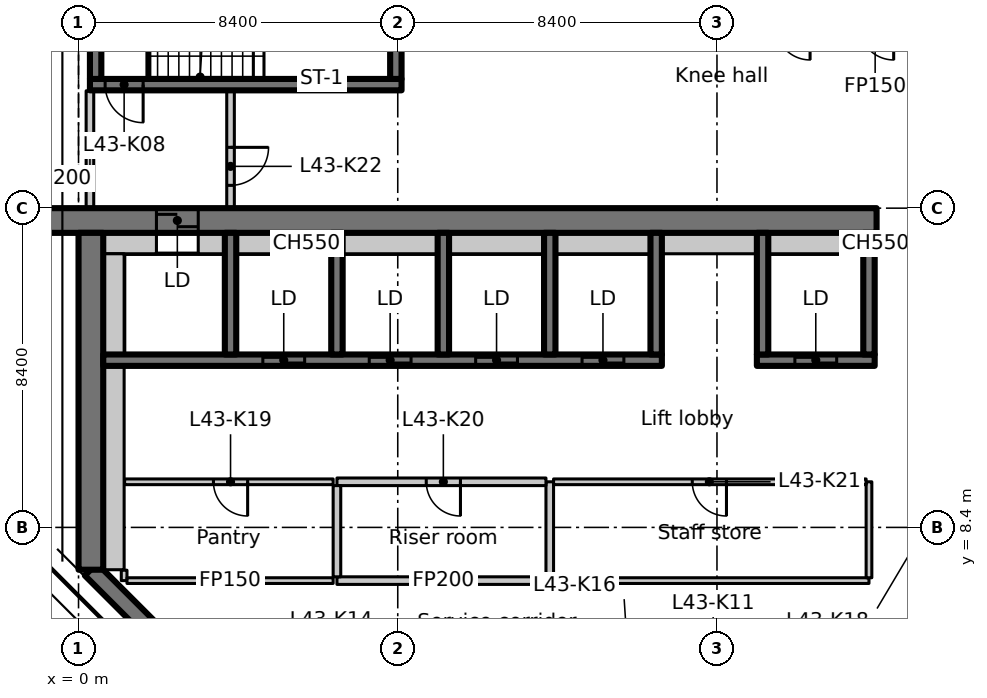
"""IFC4 building model, lengths in metres.
Left out: names, types, materials, properties, quantities, classifications, styles, units other than length and angle.
Written with IfcOpenShell. Run it as: python <this file> out.ifc"""

import sys

from ifc_helpers import new_model, si_unit, direction, frame, frame_2d, origin, place, context, subcontext, project, spatial, rectangle, extrude, element, fill, save


model = new_model("IFC4")
c1 = context("Model", 3, precision=1e-05, world=origin(), true_north=direction((0.0, 1.0)))
c2 = subcontext(c1, "Body", "Model", "MODEL_VIEW")
j1 = project(units=[si_unit("LENGTHUNIT", "METRE"), si_unit("PLANEANGLEUNIT", "RADIAN")], contexts=[c1])
p1 = place(None, origin())
s1 = spatial("IfcSite", under=j1, at=p1, CompositionType="ELEMENT")
p2 = place(p1, origin())
s2 = spatial("IfcBuilding", under=s1, at=p2, CompositionType="ELEMENT")
p3 = place(p2, frame((0.0, 0.0, 174.0)))
s3 = spatial("IfcBuildingStorey", under=s2, at=p3, CompositionType="ELEMENT", Elevation=174.0)
p4 = place(p3, frame((0.325, 7.293, 0.0), z_axis=(0.0, 0.0, 1.0), x_axis=(0.707106781187, -0.707106781187, 0.0)))
e1 = element("IfcWall", 1, at=p4, inside=s3, PredefinedType="SHEAR", context=c2, shape_type="SweptSolid", body=[
    extrude(rectangle(XDim=9.854, YDim=0.45, at=frame_2d((4.927, 0.0))), origin(), (0.0, 0.0, 1.0), 3.35),
])
p5 = place(p3, frame((-1.1, 16.475, 0.0), z_axis=(0.0, 0.0, 1.0), x_axis=(1.0, 0.0, 0.0)))
e2 = element("IfcWall", 2, at=p5, inside=s3, PredefinedType="SHEAR", context=c2, shape_type="SweptSolid", body=[
    extrude(rectangle(XDim=22.1, YDim=0.65, at=frame_2d((11.05, 0.0))), origin(), (0.0, 0.0, 1.0), 3.35),
])
p6 = place(p5, frame((3.15, 0.0, 0.0)))
e3 = element("IfcOpeningElement", 3, at=p6, cuts=e2, PredefinedType="OPENING", context=c2, shape_type="SweptSolid", body=[
    extrude(rectangle(XDim=1.1, YDim=2.3, at=frame_2d((0.55, 1.15))), frame((0.0, 0.335, 0.0), z_axis=(0.0, -1.0, 0.0), x_axis=(1.0, 0.0, 0.0)), (0.0, 0.0, 1.0), 0.67),
])
p7 = place(p3, frame((0.325, 7.286, 0.0), z_axis=(0.0, 0.0, 1.0), x_axis=(0.0, 1.0, 0.0)))
e4 = element("IfcWall", 4, at=p7, inside=s3, PredefinedType="SHEAR", context=c2, shape_type="SweptSolid", body=[
    extrude(rectangle(XDim=8.864, YDim=0.65, at=frame_2d((4.432, 0.0))), origin(), (0.0, 0.0, 1.0), 3.35),
])
p8 = place(p3, frame((0.65, 15.875, 0.0), z_axis=(0.0, 0.0, 1.0), x_axis=(1.0, 0.0, 0.0)))
e5 = element("IfcWall", 5, at=p8, inside=s3, PredefinedType="PARTITIONING", context=c2, shape_type="SweptSolid", body=[
    extrude(rectangle(XDim=1.4, YDim=0.55, at=frame_2d((0.7, 0.0))), origin(), (0.0, 0.0, 1.0), 3.35),
])
p9 = place(p3, frame((0.65, 12.8, 0.0), z_axis=(0.0, 0.0, 1.0), x_axis=(1.0, 0.0, 0.0)))
e6 = element("IfcWall", 6, at=p9, inside=s3, PredefinedType="SHEAR", context=c2, shape_type="SweptSolid", body=[
    extrude(rectangle(XDim=14.7, YDim=0.3, at=frame_2d((7.35, 0.0))), origin(), (0.0, 0.0, 1.0), 3.35),
])
p10 = place(p9, frame((4.2, 0.0, 0.0)))
e7 = element("IfcOpeningElement", 7, at=p10, cuts=e6, PredefinedType="OPENING", context=c2, shape_type="SweptSolid", body=[
    extrude(rectangle(XDim=1.1, YDim=2.3, at=frame_2d((0.55, 1.15))), frame((0.0, 0.16, 0.0), z_axis=(0.0, -1.0, 0.0), x_axis=(1.0, 0.0, 0.0)), (0.0, 0.0, 1.0), 0.32),
])
p11 = place(p9, frame((7.0, 0.0, 0.0)))
e8 = element("IfcOpeningElement", 8, at=p11, cuts=e6, PredefinedType="OPENING", context=c2, shape_type="SweptSolid", body=[
    extrude(rectangle(XDim=1.1, YDim=2.3, at=frame_2d((0.55, 1.15))), frame((0.0, 0.16, 0.0), z_axis=(0.0, -1.0, 0.0), x_axis=(1.0, 0.0, 0.0)), (0.0, 0.0, 1.0), 0.32),
])
p12 = place(p9, frame((9.8, 0.0, 0.0)))
e9 = element("IfcOpeningElement", 9, at=p12, cuts=e6, PredefinedType="OPENING", context=c2, shape_type="SweptSolid", body=[
    extrude(rectangle(XDim=1.1, YDim=2.3, at=frame_2d((0.55, 1.15))), frame((0.0, 0.16, 0.0), z_axis=(0.0, -1.0, 0.0), x_axis=(1.0, 0.0, 0.0)), (0.0, 0.0, 1.0), 0.32),
])
p13 = place(p9, frame((12.6, 0.0, 0.0)))
e10 = element("IfcOpeningElement", 10, at=p13, cuts=e6, PredefinedType="OPENING", context=c2, shape_type="SweptSolid", body=[
    extrude(rectangle(XDim=1.1, YDim=2.3, at=frame_2d((0.55, 1.15))), frame((0.0, 0.16, 0.0), z_axis=(0.0, -1.0, 0.0), x_axis=(1.0, 0.0, 0.0)), (0.0, 0.0, 1.0), 0.32),
])
for number, where, z_axis, x_axis in (
    (11, (4.0, 12.95, 0.0), (0.0, 0.0, 1.0), (0.0, 1.0, 0.0)),
    (12, (6.8, 12.95, 0.0), (0.0, 0.0, 1.0), (0.0, 1.0, 0.0)),
    (13, (9.6, 12.95, 0.0), (0.0, 0.0, 1.0), (0.0, 1.0, 0.0)),
    (14, (12.4, 12.95, 0.0), (0.0, 0.0, 1.0), (0.0, 1.0, 0.0)),
    (15, (15.2, 12.95, 0.0), (0.0, 0.0, 1.0), (0.0, 1.0, 0.0)),
):
    element("IfcWall", number, at=place(p3, frame(where, z_axis=z_axis, x_axis=x_axis)), inside=s3, PredefinedType="SHEAR", context=c2, shape_type="SweptSolid", body=[
        extrude(rectangle(XDim=3.2, YDim=0.3, at=frame_2d((1.6, 0.0))), origin(), (0.0, 0.0, 1.0), 3.35),
    ])
p14 = place(p3, frame((17.85, 12.8, 0.0), z_axis=(0.0, 0.0, 1.0), x_axis=(1.0, 0.0, 0.0)))
e16 = element("IfcWall", 16, at=p14, inside=s3, PredefinedType="SHEAR", context=c2, shape_type="SweptSolid", body=[
    extrude(rectangle(XDim=3.1, YDim=0.3, at=frame_2d((1.55, 0.0))), origin(), (0.0, 0.0, 1.0), 3.35),
])
p15 = place(p14, frame((1.0, 0.0, 0.0)))
e17 = element("IfcOpeningElement", 17, at=p15, cuts=e16, PredefinedType="OPENING", context=c2, shape_type="SweptSolid", body=[
    extrude(rectangle(XDim=1.1, YDim=2.3, at=frame_2d((0.55, 1.15))), frame((0.0, 0.16, 0.0), z_axis=(0.0, -1.0, 0.0), x_axis=(1.0, 0.0, 0.0)), (0.0, 0.0, 1.0), 0.32),
])
for number, where, z_axis, x_axis in (
    (18, (18.0, 12.95, 0.0), (0.0, 0.0, 1.0), (0.0, 1.0, 0.0)),
    (19, (20.8, 12.95, 0.0), (0.0, 0.0, 1.0), (0.0, 1.0, 0.0)),
):
    element("IfcWall", number, at=place(p3, frame(where, z_axis=z_axis, x_axis=x_axis)), inside=s3, PredefinedType="SHEAR", context=c2, shape_type="SweptSolid", body=[
        extrude(rectangle(XDim=3.2, YDim=0.3, at=frame_2d((1.6, 0.0))), origin(), (0.0, 0.0, 1.0), 3.35),
    ])
p16 = place(p3, frame((8.5, 20.05, 0.0), z_axis=(0.0, 0.0, 1.0), x_axis=(-1.0, 0.0, 0.0)))
e20 = element("IfcWall", 20, at=p16, inside=s3, PredefinedType="SHEAR", context=c2, shape_type="SweptSolid", body=[
    extrude(rectangle(XDim=8.2, YDim=0.3, at=frame_2d((4.1, 0.0))), origin(), (0.0, 0.0, 1.0), 3.35),
])
p17 = place(p16, frame((6.8, 0.0, 0.0)))
e21 = element("IfcOpeningElement", 21, at=p17, cuts=e20, PredefinedType="OPENING", context=c2, shape_type="SweptSolid", body=[
    extrude(rectangle(XDim=1.0, YDim=2.1, at=frame_2d((0.5, 1.05))), frame((0.0, 0.16, 0.0), z_axis=(0.0, -1.0, 0.0), x_axis=(1.0, 0.0, 0.0)), (0.0, 0.0, 1.0), 0.32),
])
for number, where, z_axis, x_axis in (
    (22, (0.45, 20.2, 0.0), (0.0, 0.0, 1.0), (0.0, 1.0, 0.0)),
    (23, (8.35, 20.2, 0.0), (0.0, 0.0, 1.0), (0.0, 1.0, 0.0)),
):
    element("IfcWall", number, at=place(p3, frame(where, z_axis=z_axis, x_axis=x_axis)), inside=s3, PredefinedType="SHEAR", context=c2, shape_type="SweptSolid", body=[
        extrude(rectangle(XDim=2.55, YDim=0.3, at=frame_2d((1.275, 0.0))), origin(), (0.0, 0.0, 1.0), 3.35),
    ])
p18 = place(p3, frame((0.3, 16.812, 0.0), z_axis=(0.0, 0.0, 1.0), x_axis=(0.0, 1.0, 0.0)))
e24 = element("IfcWall", 24, at=p18, inside=s3, PredefinedType="PARTITIONING", context=c2, shape_type="SweptSolid", body=[
    extrude(rectangle(XDim=3.076, YDim=0.2, at=frame_2d((1.538, 0.0))), origin(), (0.0, 0.0, 1.0), 2.98),
])
p19 = place(p3, frame((4.0, 19.888, 0.0), z_axis=(0.0, 0.0, 1.0), x_axis=(0.0, -1.0, 0.0)))
e25 = element("IfcWall", 25, at=p19, inside=s3, PredefinedType="PARTITIONING", context=c2, shape_type="SweptSolid", body=[
    extrude(rectangle(XDim=3.076, YDim=0.2, at=frame_2d((1.538, 0.0))), origin(), (0.0, 0.0, 1.0), 3.35),
])
p20 = place(p19, frame((1.488, 0.0, 0.0)))
e26 = element("IfcOpeningElement", 26, at=p20, cuts=e25, PredefinedType="OPENING", context=c2, shape_type="SweptSolid", body=[
    extrude(rectangle(XDim=1.0, YDim=2.1, at=frame_2d((0.5, 1.05))), frame((0.0, 0.11, 0.0), z_axis=(0.0, -1.0, 0.0), x_axis=(1.0, 0.0, 0.0)), (0.0, 0.0, 1.0), 0.22),
])
p21 = place(p3, frame((6.8, 7.0, 0.0), z_axis=(0.0, 0.0, 1.0), x_axis=(1.0, 0.0, 0.0)))
e27 = element("IfcWall", 27, at=p21, inside=s3, PredefinedType="PARTITIONING", context=c2, shape_type="SweptSolid", body=[
    extrude(rectangle(XDim=5.6, YDim=0.2, at=frame_2d((2.8, 0.0))), origin(), (0.0, 0.0, 1.0), 3.35),
])
p22 = place(p3, frame((12.4, 7.1, 0.0), z_axis=(0.0, 0.0, 1.0), x_axis=(0.0, 1.0, 0.0)))
e28 = element("IfcWall", 28, at=p22, inside=s3, PredefinedType="PARTITIONING", context=c2, shape_type="SweptSolid", body=[
    extrude(rectangle(XDim=2.5, YDim=0.2, at=frame_2d((1.25, 0.0))), origin(), (0.0, 0.0, 1.0), 3.35),
])
p23 = place(p3, frame((12.3, 9.6, 0.0), z_axis=(0.0, 0.0, 1.0), x_axis=(-1.0, 0.0, 0.0)))
e29 = element("IfcWall", 29, at=p23, inside=s3, PredefinedType="PARTITIONING", context=c2, shape_type="SweptSolid", body=[
    extrude(rectangle(XDim=5.5, YDim=0.2, at=frame_2d((2.75, 0.0))), origin(), (0.0, 0.0, 1.0), 3.35),
])
p24 = place(p23, frame((2.25, 0.0, 0.0)))
e30 = element("IfcOpeningElement", 30, at=p24, cuts=e29, PredefinedType="OPENING", context=c2, shape_type="SweptSolid", body=[
    extrude(rectangle(XDim=0.9, YDim=2.1, at=frame_2d((0.45, 1.05))), frame((0.0, 0.11, 0.0), z_axis=(0.0, -1.0, 0.0), x_axis=(1.0, 0.0, 0.0)), (0.0, 0.0, 1.0), 0.22),
])
p25 = place(p3, frame((6.8, 9.5, 0.0), z_axis=(0.0, 0.0, 1.0), x_axis=(0.0, -1.0, 0.0)))
e31 = element("IfcWall", 31, at=p25, inside=s3, PredefinedType="PARTITIONING", context=c2, shape_type="SweptSolid", body=[
    extrude(rectangle(XDim=2.4, YDim=0.2, at=frame_2d((1.2, 0.0))), origin(), (0.0, 0.0, 1.0), 3.35),
])
p26 = place(p3, frame((6.7, 9.6, 0.0), z_axis=(0.0, 0.0, 1.0), x_axis=(-1.0, 0.0, 0.0)))
e32 = element("IfcWall", 32, at=p26, inside=s3, PredefinedType="PARTITIONING", context=c2, shape_type="SweptSolid", body=[
    extrude(rectangle(XDim=5.488, YDim=0.15, at=frame_2d((2.744, 0.0))), origin(), (0.0, 0.0, 1.0), 3.35),
])
p27 = place(p26, frame((2.25, 0.0, 0.0)))
e33 = element("IfcOpeningElement", 33, at=p27, cuts=e32, PredefinedType="OPENING", context=c2, shape_type="SweptSolid", body=[
    extrude(rectangle(XDim=0.9, YDim=2.1, at=frame_2d((0.45, 1.05))), frame((0.0, 0.085, 0.0), z_axis=(0.0, -1.0, 0.0), x_axis=(1.0, 0.0, 0.0)), (0.0, 0.0, 1.0), 0.17),
])
p28 = place(p3, frame((1.2, 7.274, 0.0), z_axis=(0.0, 0.0, 1.0), x_axis=(0.0, -1.0, 0.0)))
e34 = element("IfcWall", 34, at=p28, inside=s3, PredefinedType="PARTITIONING", context=c2, shape_type="SweptSolid", body=[
    extrude(rectangle(XDim=0.274, YDim=0.15, at=frame_2d((0.137, 0.0))), origin(), (0.0, 0.0, 1.0), 3.35),
])
p29 = place(p3, frame((1.275, 7.0, 0.0), z_axis=(0.0, 0.0, 1.0), x_axis=(1.0, 0.0, 0.0)))
e35 = element("IfcWall", 35, at=p29, inside=s3, PredefinedType="PARTITIONING", context=c2, shape_type="SweptSolid", body=[
    extrude(rectangle(XDim=5.425, YDim=0.15, at=frame_2d((2.712, 0.0))), origin(), (0.0, 0.0, 1.0), 3.35),
])
p30 = place(p3, frame((12.5, 7.0, 0.0), z_axis=(0.0, 0.0, 1.0), x_axis=(1.0, 0.0, 0.0)))
e36 = element("IfcWall", 36, at=p30, inside=s3, PredefinedType="PARTITIONING", context=c2, shape_type="SweptSolid", body=[
    extrude(rectangle(XDim=8.3, YDim=0.15, at=frame_2d((4.15, 0.0))), origin(), (0.0, 0.0, 1.0), 3.35),
])
p31 = place(p3, frame((20.8, 7.075, 0.0), z_axis=(0.0, 0.0, 1.0), x_axis=(0.0, 1.0, 0.0)))
e37 = element("IfcWall", 37, at=p31, inside=s3, PredefinedType="PARTITIONING", context=c2, shape_type="SweptSolid", body=[
    extrude(rectangle(XDim=2.525, YDim=0.15, at=frame_2d((1.263, 0.0))), origin(), (0.0, 0.0, 1.0), 3.35),
])
p32 = place(p3, frame((20.725, 9.6, 0.0), z_axis=(0.0, 0.0, 1.0), x_axis=(-1.0, 0.0, 0.0)))
e38 = element("IfcWall", 38, at=p32, inside=s3, PredefinedType="PARTITIONING", context=c2, shape_type="SweptSolid", body=[
    extrude(rectangle(XDim=8.225, YDim=0.15, at=frame_2d((4.113, 0.0))), origin(), (0.0, 0.0, 1.0), 3.35),
])
p33 = place(p32, frame((3.675, 0.0, 0.0)))
e39 = element("IfcOpeningElement", 39, at=p33, cuts=e38, PredefinedType="OPENING", context=c2, shape_type="SweptSolid", body=[
    extrude(rectangle(XDim=0.9, YDim=2.1, at=frame_2d((0.45, 1.05))), frame((0.0, 0.085, 0.0), z_axis=(0.0, -1.0, 0.0), x_axis=(1.0, 0.0, 0.0)), (0.0, 0.0, 1.0), 0.17),
])
p34 = place(p3, frame((0.925, 7.286, 0.0), z_axis=(0.0, 0.0, 1.0), x_axis=(0.0, 1.0, 0.0)))
e40 = element("IfcWall", 40, at=p34, inside=s3, PredefinedType="PARTITIONING", context=c2, shape_type="SweptSolid", body=[
    extrude(rectangle(XDim=5.364, YDim=0.55, at=frame_2d((2.682, 0.0))), origin(), (0.0, 0.0, 1.0), 3.35),
])
p35 = place(p3, frame((0.925, 12.95, 0.0), z_axis=(0.0, 0.0, 1.0), x_axis=(0.0, 1.0, 0.0)))
e41 = element("IfcWall", 41, at=p35, inside=s3, PredefinedType="PARTITIONING", context=c2, shape_type="SweptSolid", body=[
    extrude(rectangle(XDim=2.65, YDim=0.55, at=frame_2d((1.325, 0.0))), origin(), (0.0, 0.0, 1.0), 3.35),
])
p36 = place(p3, frame((3.15, 15.875, 0.0), z_axis=(0.0, 0.0, 1.0), x_axis=(1.0, 0.0, 0.0)))
e42 = element("IfcWall", 42, at=p36, inside=s3, PredefinedType="PARTITIONING", context=c2, shape_type="SweptSolid", body=[
    extrude(rectangle(XDim=0.7, YDim=0.55, at=frame_2d((0.35, 0.0))), origin(), (0.0, 0.0, 1.0), 3.35),
])
for number, where, z_axis, x_axis in (
    (43, (4.15, 15.875, 0.0), (0.0, 0.0, 1.0), (1.0, 0.0, 0.0)),
    (44, (6.95, 15.875, 0.0), (0.0, 0.0, 1.0), (1.0, 0.0, 0.0)),
    (45, (9.75, 15.875, 0.0), (0.0, 0.0, 1.0), (1.0, 0.0, 0.0)),
    (46, (12.55, 15.875, 0.0), (0.0, 0.0, 1.0), (1.0, 0.0, 0.0)),
    (47, (15.35, 15.875, 0.0), (0.0, 0.0, 1.0), (1.0, 0.0, 0.0)),
    (48, (18.15, 15.875, 0.0), (0.0, 0.0, 1.0), (1.0, 0.0, 0.0)),
):
    element("IfcWall", number, at=place(p3, frame(where, z_axis=z_axis, x_axis=x_axis)), inside=s3, PredefinedType="PARTITIONING", context=c2, shape_type="SweptSolid", body=[
        extrude(rectangle(XDim=2.5, YDim=0.55, at=frame_2d((1.25, 0.0))), origin(), (0.0, 0.0, 1.0), 3.35),
    ])
p37 = place(p3, frame((20.95, 15.875, 0.0), z_axis=(0.0, 0.0, 1.0), x_axis=(1.0, 0.0, 0.0)))
e49 = element("IfcWall", 49, at=p37, inside=s3, PredefinedType="PARTITIONING", context=c2, shape_type="SweptSolid", body=[
    extrude(rectangle(XDim=0.05, YDim=0.55, at=frame_2d((0.025, 0.0))), origin(), (0.0, 0.0, 1.0), 3.35),
])
p38 = place(p6, origin())
e50 = element("IfcDoor", 50, at=p38, inside=s3, OperationType="SLIDING_TO_LEFT", PredefinedType="DOOR", context=c2, shape_type="SweptSolid", body=[
    extrude(rectangle(XDim=1.1, YDim=2.3, at=frame_2d((0.55, 1.15))), frame((0.0, 0.025, 0.0), z_axis=(0.0, -1.0, 0.0), x_axis=(1.0, 0.0, 0.0)), (0.0, 0.0, 1.0), 0.05),
])
fill(e3, e50)
p39 = place(p10, origin())
e51 = element("IfcDoor", 51, at=p39, inside=s3, OperationType="SLIDING_TO_LEFT", PredefinedType="DOOR", context=c2, shape_type="SweptSolid", body=[
    extrude(rectangle(XDim=1.1, YDim=2.3, at=frame_2d((0.55, 1.15))), frame((0.0, 0.025, 0.0), z_axis=(0.0, -1.0, 0.0), x_axis=(1.0, 0.0, 0.0)), (0.0, 0.0, 1.0), 0.05),
])
fill(e7, e51)
p40 = place(p11, origin())
e52 = element("IfcDoor", 52, at=p40, inside=s3, OperationType="SLIDING_TO_LEFT", PredefinedType="DOOR", context=c2, shape_type="SweptSolid", body=[
    extrude(rectangle(XDim=1.1, YDim=2.3, at=frame_2d((0.55, 1.15))), frame((0.0, 0.025, 0.0), z_axis=(0.0, -1.0, 0.0), x_axis=(1.0, 0.0, 0.0)), (0.0, 0.0, 1.0), 0.05),
])
fill(e8, e52)
p41 = place(p12, origin())
e53 = element("IfcDoor", 53, at=p41, inside=s3, OperationType="SLIDING_TO_LEFT", PredefinedType="DOOR", context=c2, shape_type="SweptSolid", body=[
    extrude(rectangle(XDim=1.1, YDim=2.3, at=frame_2d((0.55, 1.15))), frame((0.0, 0.025, 0.0), z_axis=(0.0, -1.0, 0.0), x_axis=(1.0, 0.0, 0.0)), (0.0, 0.0, 1.0), 0.05),
])
fill(e9, e53)
p42 = place(p13, origin())
e54 = element("IfcDoor", 54, at=p42, inside=s3, OperationType="SLIDING_TO_LEFT", PredefinedType="DOOR", context=c2, shape_type="SweptSolid", body=[
    extrude(rectangle(XDim=1.1, YDim=2.3, at=frame_2d((0.55, 1.15))), frame((0.0, 0.025, 0.0), z_axis=(0.0, -1.0, 0.0), x_axis=(1.0, 0.0, 0.0)), (0.0, 0.0, 1.0), 0.05),
])
fill(e10, e54)
p43 = place(p15, origin())
e55 = element("IfcDoor", 55, at=p43, inside=s3, OperationType="SLIDING_TO_LEFT", PredefinedType="DOOR", context=c2, shape_type="SweptSolid", body=[
    extrude(rectangle(XDim=1.1, YDim=2.3, at=frame_2d((0.55, 1.15))), frame((0.0, 0.025, 0.0), z_axis=(0.0, -1.0, 0.0), x_axis=(1.0, 0.0, 0.0)), (0.0, 0.0, 1.0), 0.05),
])
fill(e17, e55)
p44 = place(p17, origin())
e56 = element("IfcDoor", 56, at=p44, inside=s3, OperationType="SINGLE_SWING_RIGHT", PredefinedType="DOOR", context=c2, shape_type="SweptSolid", body=[
    extrude(rectangle(XDim=1.0, YDim=2.1, at=frame_2d((0.5, 1.05))), frame((0.0, 0.025, 0.0), z_axis=(0.0, -1.0, 0.0), x_axis=(1.0, 0.0, 0.0)), (0.0, 0.0, 1.0), 0.05),
])
fill(e21, e56)
p45 = place(p27, origin())
e57 = element("IfcDoor", 57, at=p45, inside=s3, OperationType="SINGLE_SWING_LEFT", PredefinedType="DOOR", context=c2, shape_type="SweptSolid", body=[
    extrude(rectangle(XDim=0.9, YDim=2.1, at=frame_2d((0.45, 1.05))), frame((0.0, 0.025, 0.0), z_axis=(0.0, -1.0, 0.0), x_axis=(1.0, 0.0, 0.0)), (0.0, 0.0, 1.0), 0.05),
])
fill(e33, e57)
p46 = place(p24, origin())
e58 = element("IfcDoor", 58, at=p46, inside=s3, OperationType="SINGLE_SWING_RIGHT", PredefinedType="DOOR", context=c2, shape_type="SweptSolid", body=[
    extrude(rectangle(XDim=0.9, YDim=2.1, at=frame_2d((0.45, 1.05))), frame((0.0, 0.025, 0.0), z_axis=(0.0, -1.0, 0.0), x_axis=(1.0, 0.0, 0.0)), (0.0, 0.0, 1.0), 0.05),
])
fill(e30, e58)
p47 = place(p33, origin())
e59 = element("IfcDoor", 59, at=p47, inside=s3, OperationType="SINGLE_SWING_LEFT", PredefinedType="DOOR", context=c2, shape_type="SweptSolid", body=[
    extrude(rectangle(XDim=0.9, YDim=2.1, at=frame_2d((0.45, 1.05))), frame((0.0, 0.025, 0.0), z_axis=(0.0, -1.0, 0.0), x_axis=(1.0, 0.0, 0.0)), (0.0, 0.0, 1.0), 0.05),
])
fill(e39, e59)
p48 = place(p20, origin())
e60 = element("IfcDoor", 60, at=p48, inside=s3, OperationType="SINGLE_SWING_RIGHT", PredefinedType="DOOR", context=c2, shape_type="SweptSolid", body=[
    extrude(rectangle(XDim=1.0, YDim=2.1, at=frame_2d((0.5, 1.05))), frame((0.0, 0.025, 0.0), z_axis=(0.0, -1.0, 0.0), x_axis=(1.0, 0.0, 0.0)), (0.0, 0.0, 1.0), 0.05),
])
fill(e26, e60)
save(model, sys.argv[1])
